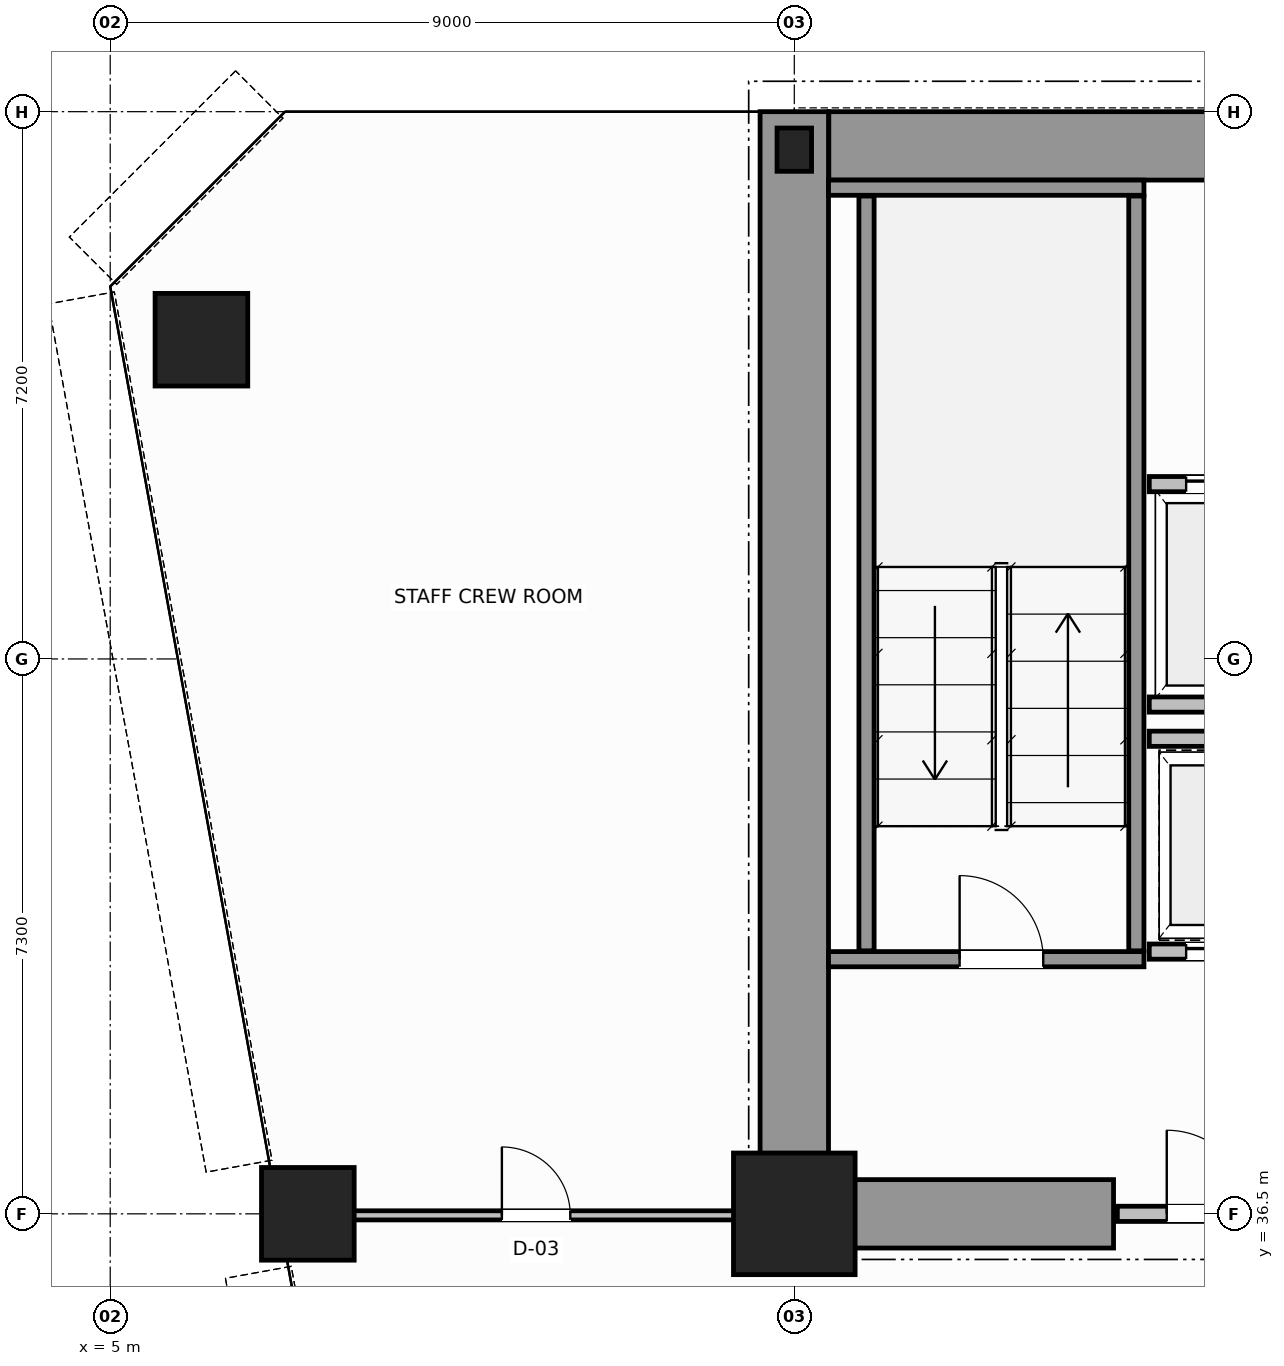
"""IFC4 building model, lengths in metres.
Left out: names, types, materials, properties, quantities, classifications, styles, units other than length and angle.
Written with IfcOpenShell. Run it as: python <this file> out.ifc"""

import sys

from ifc_helpers import new_model, si_unit, direction, frame, frame_2d, origin, origin_2d, place, context, subcontext, project, spatial, rectangle, hollow_circle, i_section, extrude, source, transform, mapped, element, fill, save


model = new_model("IFC4")
c1 = context("Model", 3, precision=1e-05, world=origin(), true_north=direction((0.0, 1.0)))
c2 = subcontext(c1, "Body", "Model", "MODEL_VIEW")
j1 = project(units=[si_unit("LENGTHUNIT", "METRE"), si_unit("PLANEANGLEUNIT", "RADIAN")], contexts=[c1])
p1 = place(None, origin())
s1 = spatial("IfcSite", under=j1, at=p1, CompositionType="ELEMENT")
p2 = place(p1, origin())
s2 = spatial("IfcBuilding", under=s1, at=p2, CompositionType="ELEMENT")
p3 = place(p2, frame((0.0, 0.0, 30.2)))
s3 = spatial("IfcBuildingStorey", under=s2, at=p3, CompositionType="ELEMENT", Elevation=30.2)
m1 = source(origin(), c2, "Body", "SweptSolid", [
    extrude(rectangle(XDim=1.6, YDim=1.6, at=origin_2d()), origin(), (0.0, 0.0, 1.0), 3.8),
])
p4 = place(p3, frame((14.0, 36.5, 0.0), z_axis=(0.0, 0.0, 1.0), x_axis=(1.0, 0.0, 0.0)))
e1 = element("IfcColumn", 1, at=p4, inside=s3, PredefinedType="COLUMN", context=c2, shape_type="MappedRepresentation", body=[
    mapped(m1, transform((0.0, 0.0, 0.0), scale=1.0)),
])
m2 = source(origin(), c2, "Body", "SweptSolid", [
    extrude(i_section(OverallWidth=0.454, OverallDepth=0.569, WebThickness=0.078, FlangeThickness=0.08, FilletRadius=0.015, at=origin_2d()), origin(), (0.0, 0.0, 1.0), 3.8),
])
p5 = place(p3, frame((14.0, 50.5, 0.0), z_axis=(0.0, 0.0, 1.0), x_axis=(1.0, 0.0, 0.0)))
e2 = element("IfcColumn", 2, at=p5, inside=s3, PredefinedType="COLUMN", context=c2, shape_type="MappedRepresentation", body=[
    mapped(m2, transform((0.0, 0.0, 0.0), scale=1.0)),
])
m3 = source(origin(), c2, "Body", "SweptSolid", [
    extrude(hollow_circle(Radius=0.61, WallThickness=0.05, at=origin_2d()), origin(), (0.0, 0.0, 1.0), 3.8),
])
for number, where, z_axis, x_axis in (
    (3, (6.2, 48.0, 0.0), (0.0, 0.0, 1.0), (1.0, 0.0, 0.0)),
    (4, (7.6, 36.5, 0.0), (0.0, 0.0, 1.0), (1.0, 0.0, 0.0)),
):
    element("IfcColumn", number, at=place(p3, frame(where, z_axis=z_axis, x_axis=x_axis)), inside=s3, PredefinedType="COLUMN", context=c2, shape_type="MappedRepresentation", body=[
        mapped(m3, transform((0.0, 0.0, 0.0), scale=1.0)),
    ])
p6 = place(p3, frame((14.454, 50.55, 0.0), z_axis=(0.0, 0.0, 1.0), x_axis=(1.0, 0.0, 0.0)))
e5 = element("IfcWall", 5, at=p6, inside=s3, PredefinedType="SHEAR", context=c2, shape_type="SweptSolid", body=[
    extrude(rectangle(XDim=19.544, YDim=0.9, at=frame_2d((9.772, 0.0))), origin(), (0.0, 0.0, 1.0), 3.8),
])
p7 = place(p3, frame((14.0, 36.5, 0.0), z_axis=(0.0, 0.0, 1.0), x_axis=(0.0, 1.0, 0.0)))
e6 = element("IfcWall", 6, at=p7, inside=s3, PredefinedType="SHEAR", context=c2, shape_type="SweptSolid", body=[
    extrude(rectangle(XDim=14.5, YDim=0.9, at=frame_2d((7.25, 0.0))), origin(), (0.0, 0.0, 1.0), 3.8),
])
p8 = place(p3, frame((14.47, 36.5, 0.0), z_axis=(0.0, 0.0, 1.0), x_axis=(1.0, 0.0, 0.0)))
e7 = element("IfcWall", 7, at=p8, inside=s3, PredefinedType="SHEAR", context=c2, shape_type="SweptSolid", body=[
    extrude(rectangle(XDim=3.73, YDim=0.9, at=frame_2d((1.865, 0.0))), origin(), (0.0, 0.0, 1.0), 2.38),
])
p9 = place(p3, frame((14.45, 39.85, 0.0), z_axis=(0.0, 0.0, 1.0), x_axis=(1.0, 0.0, 0.0)))
e8 = element("IfcWall", 8, at=p9, inside=s3, PredefinedType="SOLIDWALL", context=c2, shape_type="SweptSolid", body=[
    extrude(rectangle(XDim=4.15, YDim=0.2, at=frame_2d((2.075, 0.0))), origin(), (0.0, 0.0, 1.0), 3.8),
])
p10 = place(p9, frame((1.725, 0.0, 0.0)))
e9 = element("IfcOpeningElement", 9, at=p10, cuts=e8, PredefinedType="OPENING", context=c2, shape_type="SweptSolid", body=[
    extrude(rectangle(XDim=1.1, YDim=2.15, at=frame_2d((0.55, 1.075))), frame((0.0, 0.11, 0.0), z_axis=(0.0, -1.0, 0.0), x_axis=(1.0, 0.0, 0.0)), (0.0, 0.0, 1.0), 0.22),
])
p11 = place(p3, frame((14.45, 50.0, 0.0), z_axis=(0.0, 0.0, 1.0), x_axis=(1.0, 0.0, 0.0)))
e10 = element("IfcWall", 10, at=p11, inside=s3, PredefinedType="SOLIDWALL", context=c2, shape_type="SweptSolid", body=[
    extrude(rectangle(XDim=4.15, YDim=0.2, at=frame_2d((2.075, 0.0))), origin(), (0.0, 0.0, 1.0), 3.8),
])
for number, where, z_axis, x_axis in (
    (11, (14.95, 39.96, 0.0), (0.0, 0.0, 1.0), (0.0, 1.0, 0.0)),
    (12, (18.5, 39.96, 0.0), (0.0, 0.0, 1.0), (0.0, 1.0, 0.0)),
):
    element("IfcWall", number, at=place(p3, frame(where, z_axis=z_axis, x_axis=x_axis)), inside=s3, PredefinedType="SOLIDWALL", context=c2, shape_type="SweptSolid", body=[
        extrude(rectangle(XDim=9.93, YDim=0.2, at=frame_2d((4.965, 0.0))), origin(), (0.0, 0.0, 1.0), 3.8),
    ])
p12 = place(p3, frame((18.25, 36.5, 0.0), z_axis=(0.0, 0.0, 1.0), x_axis=(1.0, 0.0, 0.0)))
e13 = element("IfcWall", 13, at=p12, inside=s3, PredefinedType="SOLIDWALL", context=c2, shape_type="SweptSolid", body=[
    extrude(rectangle(XDim=2.47, YDim=0.2, at=frame_2d((1.235, 0.0))), origin(), (0.0, 0.0, 1.0), 2.37),
])
p13 = place(p12, frame((0.65, 0.0, 0.0)))
e14 = element("IfcOpeningElement", 14, at=p13, cuts=e13, PredefinedType="OPENING", context=c2, shape_type="SweptSolid", body=[
    extrude(rectangle(XDim=1.1, YDim=2.15, at=frame_2d((0.55, 1.075))), frame((0.0, 0.11, 0.0), z_axis=(0.0, -1.0, 0.0), x_axis=(1.0, 0.0, 0.0)), (0.0, 0.0, 1.0), 0.22),
])
p14 = place(p3, frame((18.67, 46.1, 0.0), z_axis=(0.0, 0.0, 1.0), x_axis=(1.0, 0.0, 0.0)))
e15 = element("IfcWall", 15, at=p14, inside=s3, PredefinedType="SOLIDWALL", context=c2, shape_type="SweptSolid", body=[
    extrude(rectangle(XDim=2.07, YDim=0.2, at=frame_2d((1.035, 0.0))), origin(), (0.0, 0.0, 1.0), 3.58),
])
p15 = place(p14, frame((0.485, 0.0, 0.0)))
e16 = element("IfcOpeningElement", 16, at=p15, cuts=e15, PredefinedType="OPENING", context=c2, shape_type="SweptSolid", body=[
    extrude(rectangle(XDim=1.1, YDim=2.15, at=frame_2d((0.55, 1.075))), frame((0.0, 0.11, 0.0), z_axis=(0.0, -1.0, 0.0), x_axis=(1.0, 0.0, 0.0)), (0.0, 0.0, 1.0), 0.22),
])
p16 = place(p3, frame((18.67, 43.2, 0.0), z_axis=(0.0, 0.0, 1.0), x_axis=(1.0, 0.0, 0.0)))
e17 = element("IfcWall", 17, at=p16, inside=s3, PredefinedType="SOLIDWALL", context=c2, shape_type="SweptSolid", body=[
    extrude(rectangle(XDim=2.07, YDim=0.2, at=frame_2d((1.035, 0.0))), origin(), (0.0, 0.0, 1.0), 3.58),
])
p17 = place(p3, frame((18.67, 39.95, 0.0), z_axis=(0.0, 0.0, 1.0), x_axis=(1.0, 0.0, 0.0)))
e18 = element("IfcWall", 18, at=p17, inside=s3, PredefinedType="SOLIDWALL", context=c2, shape_type="SweptSolid", body=[
    extrude(rectangle(XDim=2.07, YDim=0.2, at=frame_2d((1.035, 0.0))), origin(), (0.0, 0.0, 1.0), 3.58),
])
p18 = place(p17, frame((0.485, 0.0, 0.0)))
e19 = element("IfcOpeningElement", 19, at=p18, cuts=e18, PredefinedType="OPENING", context=c2, shape_type="SweptSolid", body=[
    extrude(rectangle(XDim=1.1, YDim=2.15, at=frame_2d((0.55, 1.075))), frame((0.0, 0.11, 0.0), z_axis=(0.0, -1.0, 0.0), x_axis=(1.0, 0.0, 0.0)), (0.0, 0.0, 1.0), 0.22),
])
p19 = place(p3, frame((18.67, 42.75, 0.0), z_axis=(0.0, 0.0, 1.0), x_axis=(1.0, 0.0, 0.0)))
e20 = element("IfcWall", 20, at=p19, inside=s3, PredefinedType="SOLIDWALL", context=c2, shape_type="SweptSolid", body=[
    extrude(rectangle(XDim=2.07, YDim=0.2, at=frame_2d((1.035, 0.0))), origin(), (0.0, 0.0, 1.0), 3.58),
])
p20 = place(p3, frame((7.265, 36.48, 0.0), z_axis=(0.0, 0.0, 1.0), x_axis=(1.0, 0.0, 0.0)))
e21 = element("IfcWall", 21, at=p20, inside=s3, PredefinedType="PARTITIONING", context=c2, shape_type="SweptSolid", body=[
    extrude(rectangle(XDim=6.675, YDim=0.12, at=frame_2d((3.337, 0.0))), origin(), (0.0, 0.0, 1.0), 2.77),
])
p21 = place(p20, frame((2.888, 0.0, 0.0)))
e22 = element("IfcOpeningElement", 22, at=p21, cuts=e21, PredefinedType="OPENING", context=c2, shape_type="SweptSolid", body=[
    extrude(rectangle(XDim=0.9, YDim=2.15, at=frame_2d((0.45, 1.075))), frame((0.0, 0.07, 0.0), z_axis=(0.0, -1.0, 0.0), x_axis=(1.0, 0.0, 0.0)), (0.0, 0.0, 1.0), 0.14),
])
m4 = source(origin(), c2, "Body", "SweptSolid", [
    extrude(rectangle(XDim=1.1, YDim=2.15, at=frame_2d((0.55, 1.075))), frame((0.0, 0.025, 0.0), z_axis=(0.0, -1.0, 0.0), x_axis=(1.0, 0.0, 0.0)), (0.0, 0.0, 1.0), 0.05),
])
p22 = place(p10, origin())
e23 = element("IfcDoor", 23, at=p22, inside=s3, OperationType="SINGLE_SWING_LEFT", PredefinedType="DOOR", context=c2, shape_type="MappedRepresentation", body=[
    mapped(m4, transform((0.0, 0.0, 0.0), scale=1.0)),
])
fill(e9, e23)
p23 = place(p13, origin())
e24 = element("IfcDoor", 24, at=p23, inside=s3, OperationType="SINGLE_SWING_RIGHT", PredefinedType="DOOR", context=c2, shape_type="MappedRepresentation", body=[
    mapped(m4, transform((0.0, 0.0, 0.0), scale=1.0)),
])
fill(e14, e24)
p24 = place(p15, origin())
e25 = element("IfcDoor", 25, at=p24, inside=s3, OperationType="DOUBLE_DOOR_SLIDING", PredefinedType="DOOR", context=c2, shape_type="MappedRepresentation", body=[
    mapped(m4, transform((0.0, 0.0, 0.0), scale=1.0)),
])
fill(e16, e25)
p25 = place(p18, origin())
e26 = element("IfcDoor", 26, at=p25, inside=s3, OperationType="DOUBLE_DOOR_SLIDING", PredefinedType="DOOR", context=c2, shape_type="MappedRepresentation", body=[
    mapped(m4, transform((0.0, 0.0, 0.0), scale=1.0)),
])
fill(e19, e26)
m5 = source(origin(), c2, "Body", "SweptSolid", [
    extrude(rectangle(XDim=0.9, YDim=2.15, at=frame_2d((0.45, 1.075))), frame((0.0, 0.025, 0.0), z_axis=(0.0, -1.0, 0.0), x_axis=(1.0, 0.0, 0.0)), (0.0, 0.0, 1.0), 0.05),
])
p26 = place(p21, origin())
e27 = element("IfcDoor", 27, at=p26, inside=s3, OperationType="SINGLE_SWING_LEFT", PredefinedType="DOOR", context=c2, shape_type="MappedRepresentation", body=[
    mapped(m5, transform((0.0, 0.0, 0.0), scale=1.0)),
])
fill(e22, e27)
save(model, sys.argv[1])
